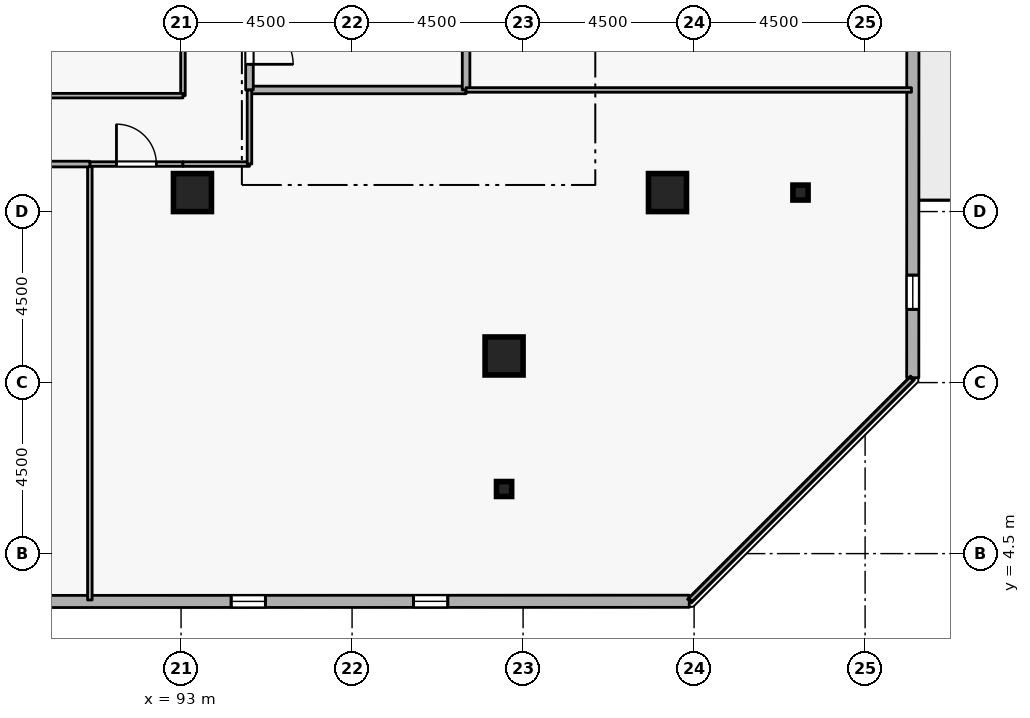
"""IFC4 building model, lengths in metres.
Left out: names, types, materials, properties, quantities, classifications, styles, units other than length and angle.
Written with IfcOpenShell. Run it as: python <this file> out.ifc"""

import sys

from ifc_helpers import new_model, si_unit, direction, frame, frame_2d, origin, origin_2d, place, context, subcontext, project, spatial, rectangle, i_section, extrude, element, fill, save


model = new_model("IFC4")
c1 = context("Model", 3, precision=1e-05, world=origin(), true_north=direction((0.0, 1.0)))
c2 = subcontext(c1, "Body", "Model", "MODEL_VIEW")
j1 = project(units=[si_unit("LENGTHUNIT", "METRE"), si_unit("PLANEANGLEUNIT", "RADIAN")], contexts=[c1])
p1 = place(None, origin())
s1 = spatial("IfcSite", under=j1, at=p1, CompositionType="ELEMENT")
p2 = place(p1, origin())
s2 = spatial("IfcBuilding", under=s1, at=p2, CompositionType="ELEMENT")
p3 = place(p2, frame((0.0, 0.0, 233.1)))
s3 = spatial("IfcBuildingStorey", under=s2, at=p3, CompositionType="ELEMENT", Elevation=233.1)
for number, where, z_axis, x_axis in (
    (1, (105.8, 14.0, 0.0), (0.0, 0.0, 1.0), (1.0, 0.0, 0.0)),
    (2, (101.5, 9.7, 0.0), (0.0, 0.0, 1.0), (1.0, 0.0, 0.0)),
    (3, (93.3, 14.0, 0.0), (0.0, 0.0, 1.0), (1.0, 0.0, 0.0)),
):
    element("IfcColumn", number, at=place(p3, frame(where, z_axis=z_axis, x_axis=x_axis)), inside=s3, PredefinedType="COLUMN", context=c2, shape_type="SweptSolid", body=[
        extrude(rectangle(XDim=1.0, YDim=1.0, at=origin_2d()), origin(), (0.0, 0.0, 1.0), 3.6),
    ])
for number, where, z_axis, x_axis in (
    (4, (109.3, 14.0, 0.0), (0.0, 0.0, 1.0), (1.0, 0.0, 0.0)),
    (5, (101.5, 6.2, 0.0), (0.0, 0.0, 1.0), (1.0, 0.0, 0.0)),
):
    element("IfcColumn", number, at=place(p3, frame(where, z_axis=z_axis, x_axis=x_axis)), inside=s3, PredefinedType="COLUMN", context=c2, shape_type="SweptSolid", body=[
        extrude(i_section(OverallWidth=0.399, OverallDepth=0.394, WebThickness=0.023, FlangeThickness=0.037, FilletRadius=0.015, at=origin_2d()), origin(), (0.0, 0.0, 1.0), 3.6),
    ])
p4 = place(p3, frame((73.319, 3.235, 0.0), z_axis=(0.0, 0.0, 1.0), x_axis=(0.999999944762, 0.000332378036, 0.0)))
e6 = element("IfcWall", 6, at=p4, inside=s3, PredefinedType="STANDARD", context=c2, shape_type="SweptSolid", body=[
    extrude(rectangle(XDim=33.054, YDim=0.32, at=frame_2d((16.527, 0.0))), origin(), (0.0, 0.0, 1.0), 2.7),
])
p5 = place(p4, frame((1.8, 0.0, 0.72)))
e7 = element("IfcOpeningElement", 7, at=p5, cuts=e6, PredefinedType="OPENING", context=c2, shape_type="SweptSolid", body=[
    extrude(rectangle(XDim=0.9, YDim=1.75, at=frame_2d((0.45, 0.875))), frame((0.0, 0.17, 0.0), z_axis=(0.0, -1.0, 0.0), x_axis=(1.0, 0.0, 0.0)), (0.0, 0.0, 1.0), 0.34),
])
p6 = place(p4, frame((6.6, 0.0, 0.72)))
e8 = element("IfcOpeningElement", 8, at=p6, cuts=e6, PredefinedType="OPENING", context=c2, shape_type="SweptSolid", body=[
    extrude(rectangle(XDim=0.9, YDim=1.75, at=frame_2d((0.45, 0.875))), frame((0.0, 0.17, 0.0), z_axis=(0.0, -1.0, 0.0), x_axis=(1.0, 0.0, 0.0)), (0.0, 0.0, 1.0), 0.34),
])
p7 = place(p4, frame((11.4, 0.0, 0.72)))
e9 = element("IfcOpeningElement", 9, at=p7, cuts=e6, PredefinedType="OPENING", context=c2, shape_type="SweptSolid", body=[
    extrude(rectangle(XDim=0.9, YDim=1.75, at=frame_2d((0.45, 0.875))), frame((0.0, 0.17, 0.0), z_axis=(0.0, -1.0, 0.0), x_axis=(1.0, 0.0, 0.0)), (0.0, 0.0, 1.0), 0.34),
])
p8 = place(p4, frame((21.0, 0.0, 0.72)))
e10 = element("IfcOpeningElement", 10, at=p8, cuts=e6, PredefinedType="OPENING", context=c2, shape_type="SweptSolid", body=[
    extrude(rectangle(XDim=0.9, YDim=1.75, at=frame_2d((0.45, 0.875))), frame((0.0, 0.17, 0.0), z_axis=(0.0, -1.0, 0.0), x_axis=(1.0, 0.0, 0.0)), (0.0, 0.0, 1.0), 0.34),
])
p9 = place(p4, frame((25.8, 0.0, 0.72)))
e11 = element("IfcOpeningElement", 11, at=p9, cuts=e6, PredefinedType="OPENING", context=c2, shape_type="SweptSolid", body=[
    extrude(rectangle(XDim=0.9, YDim=1.75, at=frame_2d((0.45, 0.875))), frame((0.0, 0.17, 0.0), z_axis=(0.0, -1.0, 0.0), x_axis=(1.0, 0.0, 0.0)), (0.0, 0.0, 1.0), 0.34),
])
p10 = place(p3, frame((112.254, 9.128, 0.0), z_axis=(0.0, 0.0, 1.0), x_axis=(0.000332378036, 0.999999944762, 0.0)))
e12 = element("IfcWall", 12, at=p10, inside=s3, PredefinedType="STANDARD", context=c2, shape_type="SweptSolid", body=[
    extrude(rectangle(XDim=33.054, YDim=0.32, at=frame_2d((16.527, 0.0))), origin(), (0.0, 0.0, 1.0), 2.7),
])
p11 = place(p10, frame((25.977, 0.0, 0.0)))
e13 = element("IfcOpeningElement", 13, at=p11, cuts=e12, PredefinedType="OPENING", context=c2, shape_type="SweptSolid", body=[
    extrude(rectangle(XDim=1.0, YDim=2.08, at=frame_2d((0.5, 1.04))), frame((0.0, 0.17, 0.0), z_axis=(0.0, -1.0, 0.0), x_axis=(1.0, 0.0, 0.0)), (0.0, 0.0, 1.0), 0.34),
])
p12 = place(p10, frame((1.8, 0.0, 0.72)))
e14 = element("IfcOpeningElement", 14, at=p12, cuts=e12, PredefinedType="OPENING", context=c2, shape_type="SweptSolid", body=[
    extrude(rectangle(XDim=0.9, YDim=1.75, at=frame_2d((0.45, 0.875))), frame((0.0, 0.17, 0.0), z_axis=(0.0, -1.0, 0.0), x_axis=(1.0, 0.0, 0.0)), (0.0, 0.0, 1.0), 0.34),
])
p13 = place(p10, frame((11.4, 0.0, 0.72)))
e15 = element("IfcOpeningElement", 15, at=p13, cuts=e12, PredefinedType="OPENING", context=c2, shape_type="SweptSolid", body=[
    extrude(rectangle(XDim=0.9, YDim=1.75, at=frame_2d((0.45, 0.875))), frame((0.0, 0.17, 0.0), z_axis=(0.0, -1.0, 0.0), x_axis=(1.0, 0.0, 0.0)), (0.0, 0.0, 1.0), 0.34),
])
p14 = place(p10, frame((16.2, 0.0, 0.72)))
e16 = element("IfcOpeningElement", 16, at=p14, cuts=e12, PredefinedType="OPENING", context=c2, shape_type="SweptSolid", body=[
    extrude(rectangle(XDim=0.9, YDim=1.75, at=frame_2d((0.45, 0.875))), frame((0.0, 0.17, 0.0), z_axis=(0.0, -1.0, 0.0), x_axis=(1.0, 0.0, 0.0)), (0.0, 0.0, 1.0), 0.34),
])
p15 = place(p10, frame((21.0, 0.0, 0.72)))
e17 = element("IfcOpeningElement", 17, at=p15, cuts=e12, PredefinedType="OPENING", context=c2, shape_type="SweptSolid", body=[
    extrude(rectangle(XDim=0.9, YDim=1.75, at=frame_2d((0.45, 0.875))), frame((0.0, 0.17, 0.0), z_axis=(0.0, -1.0, 0.0), x_axis=(1.0, 0.0, 0.0)), (0.0, 0.0, 1.0), 0.34),
])
p16 = place(p3, frame((94.8, 16.7, 0.0), z_axis=(0.0, 0.0, 1.0), x_axis=(1.0, 0.0, 0.0)))
e18 = element("IfcWall", 18, at=p16, inside=s3, PredefinedType="STANDARD", context=c2, shape_type="SweptSolid", body=[
    extrude(rectangle(XDim=5.7, YDim=0.2, at=frame_2d((2.85, 0.0))), origin(), (0.0, 0.0, 1.0), 3.34),
])
p17 = place(p3, frame((100.5, 16.7, 0.0), z_axis=(0.0, 0.0, 1.0), x_axis=(0.0, 1.0, 0.0)))
e19 = element("IfcWall", 19, at=p17, inside=s3, PredefinedType="STANDARD", context=c2, shape_type="SweptSolid", body=[
    extrude(rectangle(XDim=2.5, YDim=0.2, at=frame_2d((1.25, 0.0))), origin(), (0.0, 0.0, 1.0), 3.34),
])
p18 = place(p3, frame((94.8, 19.2, 0.0), z_axis=(0.0, 0.0, 1.0), x_axis=(0.0, -1.0, 0.0)))
e20 = element("IfcWall", 20, at=p18, inside=s3, PredefinedType="STANDARD", context=c2, shape_type="SweptSolid", body=[
    extrude(rectangle(XDim=2.5, YDim=0.2, at=frame_2d((1.25, 0.0))), origin(), (0.0, 0.0, 1.0), 3.34),
])
p19 = place(p18, frame((0.675, 0.0, 0.0)))
e21 = element("IfcOpeningElement", 21, at=p19, cuts=e20, PredefinedType="OPENING", context=c2, shape_type="SweptSolid", body=[
    extrude(rectangle(XDim=1.15, YDim=2.1, at=frame_2d((0.575, 1.05))), frame((0.0, 0.11, 0.0), z_axis=(0.0, -1.0, 0.0), x_axis=(1.0, 0.0, 0.0)), (0.0, 0.0, 1.0), 0.22),
])
p20 = place(p3, frame((90.6, 3.28, 0.0), z_axis=(0.0, 0.0, 1.0), x_axis=(0.0, 1.0, 0.0)))
e22 = element("IfcWall", 22, at=p20, inside=s3, PredefinedType="PARTITIONING", context=c2, shape_type="SweptSolid", body=[
    extrude(rectangle(XDim=11.47, YDim=0.12, at=frame_2d((5.735, 0.0))), origin(), (0.0, 0.0, 1.0), 3.34),
])
p21 = place(p3, frame((90.6, 14.75, 0.0), z_axis=(0.0, 0.0, 1.0), x_axis=(1.0, 0.0, 0.0)))
e23 = element("IfcWall", 23, at=p21, inside=s3, PredefinedType="PARTITIONING", context=c2, shape_type="SweptSolid", body=[
    extrude(rectangle(XDim=2.45, YDim=0.12, at=frame_2d((1.225, 0.0))), origin(), (0.0, 0.0, 1.0), 3.34),
])
p22 = place(p21, frame((0.7, 0.0, 0.0)))
e24 = element("IfcOpeningElement", 24, at=p22, cuts=e23, PredefinedType="OPENING", context=c2, shape_type="SweptSolid", body=[
    extrude(rectangle(XDim=1.05, YDim=2.1, at=frame_2d((0.525, 1.05))), frame((0.0, 0.07, 0.0), z_axis=(0.0, -1.0, 0.0), x_axis=(1.0, 0.0, 0.0)), (0.0, 0.0, 1.0), 0.14),
])
p23 = place(p3, frame((93.05, 14.75, 0.0), z_axis=(0.0, 0.0, 1.0), x_axis=(1.0, 0.0, 0.0)))
e25 = element("IfcWall", 25, at=p23, inside=s3, PredefinedType="PARTITIONING", context=c2, shape_type="SweptSolid", body=[
    extrude(rectangle(XDim=1.75, YDim=0.12, at=frame_2d((0.875, 0.0))), origin(), (0.0, 0.0, 1.0), 3.34),
])
p24 = place(p3, frame((94.8, 14.75, 0.0), z_axis=(0.0, 0.0, 1.0), x_axis=(0.0, 1.0, 0.0)))
e26 = element("IfcWall", 26, at=p24, inside=s3, PredefinedType="PARTITIONING", context=c2, shape_type="SweptSolid", body=[
    extrude(rectangle(XDim=1.95, YDim=0.12, at=frame_2d((0.975, 0.0))), origin(), (0.0, 0.0, 1.0), 3.34),
])
p25 = place(p3, frame((100.5, 16.7, 0.0), z_axis=(0.0, 0.0, 1.0), x_axis=(1.0, 0.0, 0.0)))
e27 = element("IfcWall", 27, at=p25, inside=s3, PredefinedType="PARTITIONING", context=c2, shape_type="SweptSolid", body=[
    extrude(rectangle(XDim=11.72, YDim=0.12, at=frame_2d((5.86, 0.0))), origin(), (0.0, 0.0, 1.0), 3.34),
])
p26 = place(p3, frame((112.22, 9.098, 0.0), z_axis=(0.0, 0.0, 1.0), x_axis=(-0.707106781187, -0.707106781187, 0.0)))
e28 = element("IfcWall", 28, at=p26, inside=s3, PredefinedType="PARTITIONING", context=c2, shape_type="SweptSolid", body=[
    extrude(rectangle(XDim=8.227, YDim=0.12, at=frame_2d((4.114, 0.0))), origin(), (0.0, 0.0, 1.0), 3.34),
])
p27 = place(p3, frame((86.4, 14.75, 0.0), z_axis=(0.0, 0.0, 1.0), x_axis=(1.0, 0.0, 0.0)))
e29 = element("IfcWall", 29, at=p27, inside=s3, PredefinedType="PARTITIONING", context=c2, shape_type="SweptSolid", body=[
    extrude(rectangle(XDim=4.2, YDim=0.15, at=frame_2d((2.1, 0.0))), origin(), (0.0, 0.0, 1.0), 3.34),
])
p28 = place(p27, frame((1.45, 0.0, 0.0)))
e30 = element("IfcOpeningElement", 30, at=p28, cuts=e29, PredefinedType="OPENING", context=c2, shape_type="SweptSolid", body=[
    extrude(rectangle(XDim=1.3, YDim=2.12, at=frame_2d((0.65, 1.06))), frame((0.0, 0.085, 0.0), z_axis=(0.0, -1.0, 0.0), x_axis=(1.0, 0.0, 0.0)), (0.0, 0.0, 1.0), 0.17),
])
p29 = place(p3, frame((93.05, 22.4, 0.0), z_axis=(0.0, 0.0, 1.0), x_axis=(0.0, -1.0, 0.0)))
e31 = element("IfcWall", 31, at=p29, inside=s3, PredefinedType="PARTITIONING", context=c2, shape_type="SweptSolid", body=[
    extrude(rectangle(XDim=5.85, YDim=0.12, at=frame_2d((2.925, 0.0))), origin(), (0.0, 0.0, 1.0), 3.34),
])
p30 = place(p3, frame((93.05, 16.55, 0.0), z_axis=(0.0, 0.0, 1.0), x_axis=(-1.0, 0.0, 0.0)))
e32 = element("IfcWall", 32, at=p30, inside=s3, PredefinedType="PARTITIONING", context=c2, shape_type="SweptSolid", body=[
    extrude(rectangle(XDim=9.1, YDim=0.12, at=frame_2d((4.55, 0.0))), origin(), (0.0, 0.0, 1.0), 3.34),
])
p31 = place(p30, frame((4.075, 0.0, 0.0)))
e33 = element("IfcOpeningElement", 33, at=p31, cuts=e32, PredefinedType="OPENING", context=c2, shape_type="SweptSolid", body=[
    extrude(rectangle(XDim=0.95, YDim=2.1, at=frame_2d((0.475, 1.05))), frame((0.0, 0.07, 0.0), z_axis=(0.0, -1.0, 0.0), x_axis=(1.0, 0.0, 0.0)), (0.0, 0.0, 1.0), 0.14),
])
p32 = place(p8, origin())
e34 = element("IfcWindow", 34, at=p32, inside=s3, PartitioningType="SINGLE_PANEL", PredefinedType="WINDOW", context=c2, shape_type="SweptSolid", body=[
    extrude(rectangle(XDim=0.9, YDim=1.75, at=frame_2d((0.45, 0.875))), frame((0.0, 0.03, 0.0), z_axis=(0.0, -1.0, 0.0), x_axis=(1.0, 0.0, 0.0)), (0.0, 0.0, 1.0), 0.06),
])
fill(e10, e34)
p33 = place(p9, origin())
e35 = element("IfcWindow", 35, at=p33, inside=s3, PartitioningType="SINGLE_PANEL", PredefinedType="WINDOW", context=c2, shape_type="SweptSolid", body=[
    extrude(rectangle(XDim=0.9, YDim=1.75, at=frame_2d((0.45, 0.875))), frame((0.0, 0.03, 0.0), z_axis=(0.0, -1.0, 0.0), x_axis=(1.0, 0.0, 0.0)), (0.0, 0.0, 1.0), 0.06),
])
fill(e11, e35)
p34 = place(p12, origin())
e36 = element("IfcWindow", 36, at=p34, inside=s3, PartitioningType="SINGLE_PANEL", PredefinedType="WINDOW", context=c2, shape_type="SweptSolid", body=[
    extrude(rectangle(XDim=0.9, YDim=1.75, at=frame_2d((0.45, 0.875))), frame((0.0, 0.03, 0.0), z_axis=(0.0, -1.0, 0.0), x_axis=(1.0, 0.0, 0.0)), (0.0, 0.0, 1.0), 0.06),
])
fill(e14, e36)
p35 = place(p19, origin())
e37 = element("IfcDoor", 37, at=p35, inside=s3, OperationType="SINGLE_SWING_RIGHT", PredefinedType="DOOR", context=c2, shape_type="SweptSolid", body=[
    extrude(rectangle(XDim=1.15, YDim=2.1, at=frame_2d((0.575, 1.05))), frame((0.0, 0.025, 0.0), z_axis=(0.0, -1.0, 0.0), x_axis=(1.0, 0.0, 0.0)), (0.0, 0.0, 1.0), 0.05),
])
fill(e21, e37)
p36 = place(p22, origin())
e38 = element("IfcDoor", 38, at=p36, inside=s3, OperationType="SINGLE_SWING_LEFT", PredefinedType="DOOR", context=c2, shape_type="SweptSolid", body=[
    extrude(rectangle(XDim=1.05, YDim=2.1, at=frame_2d((0.525, 1.05))), frame((0.0, 0.025, 0.0), z_axis=(0.0, -1.0, 0.0), x_axis=(1.0, 0.0, 0.0)), (0.0, 0.0, 1.0), 0.05),
])
fill(e24, e38)
save(model, sys.argv[1])
